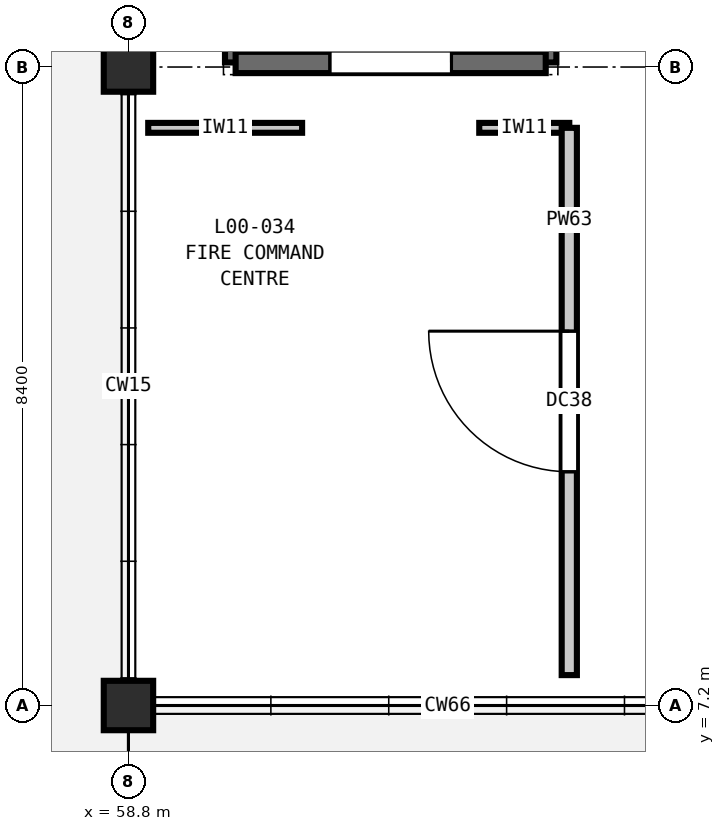
"""IFC4 building model, lengths in metres.
Left out: names, types, materials, properties, quantities, classifications, styles, units other than length and angle.
Written with IfcOpenShell. Run it as: python <this file> out.ifc"""

import sys

from ifc_helpers import new_model, si_unit, direction, frame, frame_2d, origin, origin_2d, place, context, subcontext, project, spatial, rectangle, extrude, element, fill, save


model = new_model("IFC4")
c1 = context("Model", 3, precision=1e-05, world=origin(), true_north=direction((0.0, 1.0)))
c2 = subcontext(c1, "Body", "Model", "MODEL_VIEW")
j1 = project(units=[si_unit("LENGTHUNIT", "METRE"), si_unit("PLANEANGLEUNIT", "RADIAN")], contexts=[c1])
p1 = place(None, origin())
s1 = spatial("IfcSite", under=j1, at=p1, CompositionType="ELEMENT")
p2 = place(p1, origin())
s2 = spatial("IfcBuilding", under=s1, at=p2, CompositionType="ELEMENT")
p3 = place(p2, origin())
s3 = spatial("IfcBuildingStorey", under=s2, at=p3, CompositionType="ELEMENT", Elevation=0.0)
for number, where, z_axis, x_axis in (
    (1, (58.8, 7.2, 0.0), (0.0, 0.0, 1.0), (1.0, 0.0, 0.0)),
    (2, (58.8, 15.6, 0.0), (0.0, 0.0, 1.0), (1.0, 0.0, 0.0)),
):
    element("IfcColumn", number, at=place(p3, frame(where, z_axis=z_axis, x_axis=x_axis)), inside=s3, PredefinedType="COLUMN", context=c2, shape_type="SweptSolid", body=[
        extrude(rectangle(XDim=0.65, YDim=0.65, at=origin_2d()), origin(), (0.0, 0.0, 1.0), 5.4),
    ])
for number, where, z_axis, x_axis in (
    (3, (64.29, 15.66, 0.0), (0.0, 0.0, 1.0), (0.0, 1.0, 0.0)),
    (4, (60.21, 23.64, 0.0), (0.0, 0.0, 1.0), (0.0, -1.0, 0.0)),
):
    element("IfcWall", number, at=place(p3, frame(where, z_axis=z_axis, x_axis=x_axis)), inside=s3, PredefinedType="SHEAR", context=c2, shape_type="SweptSolid", body=[
        extrude(rectangle(XDim=7.98, YDim=0.28, at=frame_2d((3.99, 0.0))), origin(), (0.0, 0.0, 1.0), 5.4),
    ])
p4 = place(p3, frame((60.21, 15.66, 0.0), z_axis=(0.0, 0.0, 1.0), x_axis=(1.0, 0.0, 0.0)))
e5 = element("IfcWall", 5, at=p4, inside=s3, PredefinedType="SHEAR", context=c2, shape_type="SweptSolid", body=[
    extrude(rectangle(XDim=4.08, YDim=0.28, at=frame_2d((2.04, 0.0))), origin(), (0.0, 0.0, 1.0), 5.4),
])
p5 = place(p4, frame((1.24, 0.0, 0.0)))
e6 = element("IfcOpeningElement", 6, at=p5, cuts=e5, PredefinedType="OPENING", context=c2, shape_type="SweptSolid", body=[
    extrude(rectangle(XDim=1.6, YDim=2.25, at=frame_2d((0.8, 1.125))), frame((0.0, 0.15, 0.0), z_axis=(0.0, -1.0, 0.0), x_axis=(1.0, 0.0, 0.0)), (0.0, 0.0, 1.0), 0.3),
])
p6 = place(p3, frame((59.06, 14.8, 0.0), z_axis=(0.0, 0.0, 1.0), x_axis=(1.0, 0.0, 0.0)))
e7 = element("IfcWall", 7, at=p6, inside=s3, PredefinedType="PARTITIONING", context=c2, shape_type="SweptSolid", body=[
    extrude(rectangle(XDim=2.025, YDim=0.13, at=frame_2d((1.012, 0.0))), origin(), (0.0, 0.0, 1.0), 5.04),
])
p7 = place(p3, frame((63.415, 14.8, 0.0), z_axis=(0.0, 0.0, 1.0), x_axis=(1.0, 0.0, 0.0)))
e8 = element("IfcWall", 8, at=p7, inside=s3, PredefinedType="PARTITIONING", context=c2, shape_type="SweptSolid", body=[
    extrude(rectangle(XDim=1.185, YDim=0.13, at=frame_2d((0.592, 0.0))), origin(), (0.0, 0.0, 1.0), 5.04),
])
p8 = place(p3, frame((64.6, 7.6, 0.0), z_axis=(0.0, 0.0, 1.0), x_axis=(0.0, 1.0, 0.0)))
e9 = element("IfcWall", 9, at=p8, inside=s3, PredefinedType="PARTITIONING", context=c2, shape_type="SweptSolid", body=[
    extrude(rectangle(XDim=7.2, YDim=0.2, at=frame_2d((3.6, 0.0))), origin(), (0.0, 0.0, 1.0), 5.04),
])
p9 = place(p8, frame((2.675, 0.0, 0.0)))
e10 = element("IfcOpeningElement", 10, at=p9, cuts=e9, PredefinedType="OPENING", context=c2, shape_type="SweptSolid", body=[
    extrude(rectangle(XDim=1.85, YDim=2.3, at=frame_2d((0.925, 1.15))), frame((0.0, 0.11, 0.0), z_axis=(0.0, -1.0, 0.0), x_axis=(1.0, 0.0, 0.0)), (0.0, 0.0, 1.0), 0.22),
])
p10 = place(p5, origin())
e11 = element("IfcDoor", 11, at=p10, inside=s3, OperationType="SINGLE_SWING_RIGHT", PredefinedType="DOOR", context=c2, shape_type="SweptSolid", body=[
    extrude(rectangle(XDim=1.6, YDim=2.25, at=frame_2d((0.8, 1.125))), frame((0.0, 0.025, 0.0), z_axis=(0.0, -1.0, 0.0), x_axis=(1.0, 0.0, 0.0)), (0.0, 0.0, 1.0), 0.05),
])
fill(e6, e11)
p11 = place(p9, origin())
e12 = element("IfcDoor", 12, at=p11, inside=s3, OperationType="SINGLE_SWING_RIGHT", PredefinedType="DOOR", context=c2, shape_type="SweptSolid", body=[
    extrude(rectangle(XDim=1.85, YDim=2.3, at=frame_2d((0.925, 1.15))), frame((0.0, 0.025, 0.0), z_axis=(0.0, -1.0, 0.0), x_axis=(1.0, 0.0, 0.0)), (0.0, 0.0, 1.0), 0.05),
])
fill(e10, e12)
save(model, sys.argv[1])
